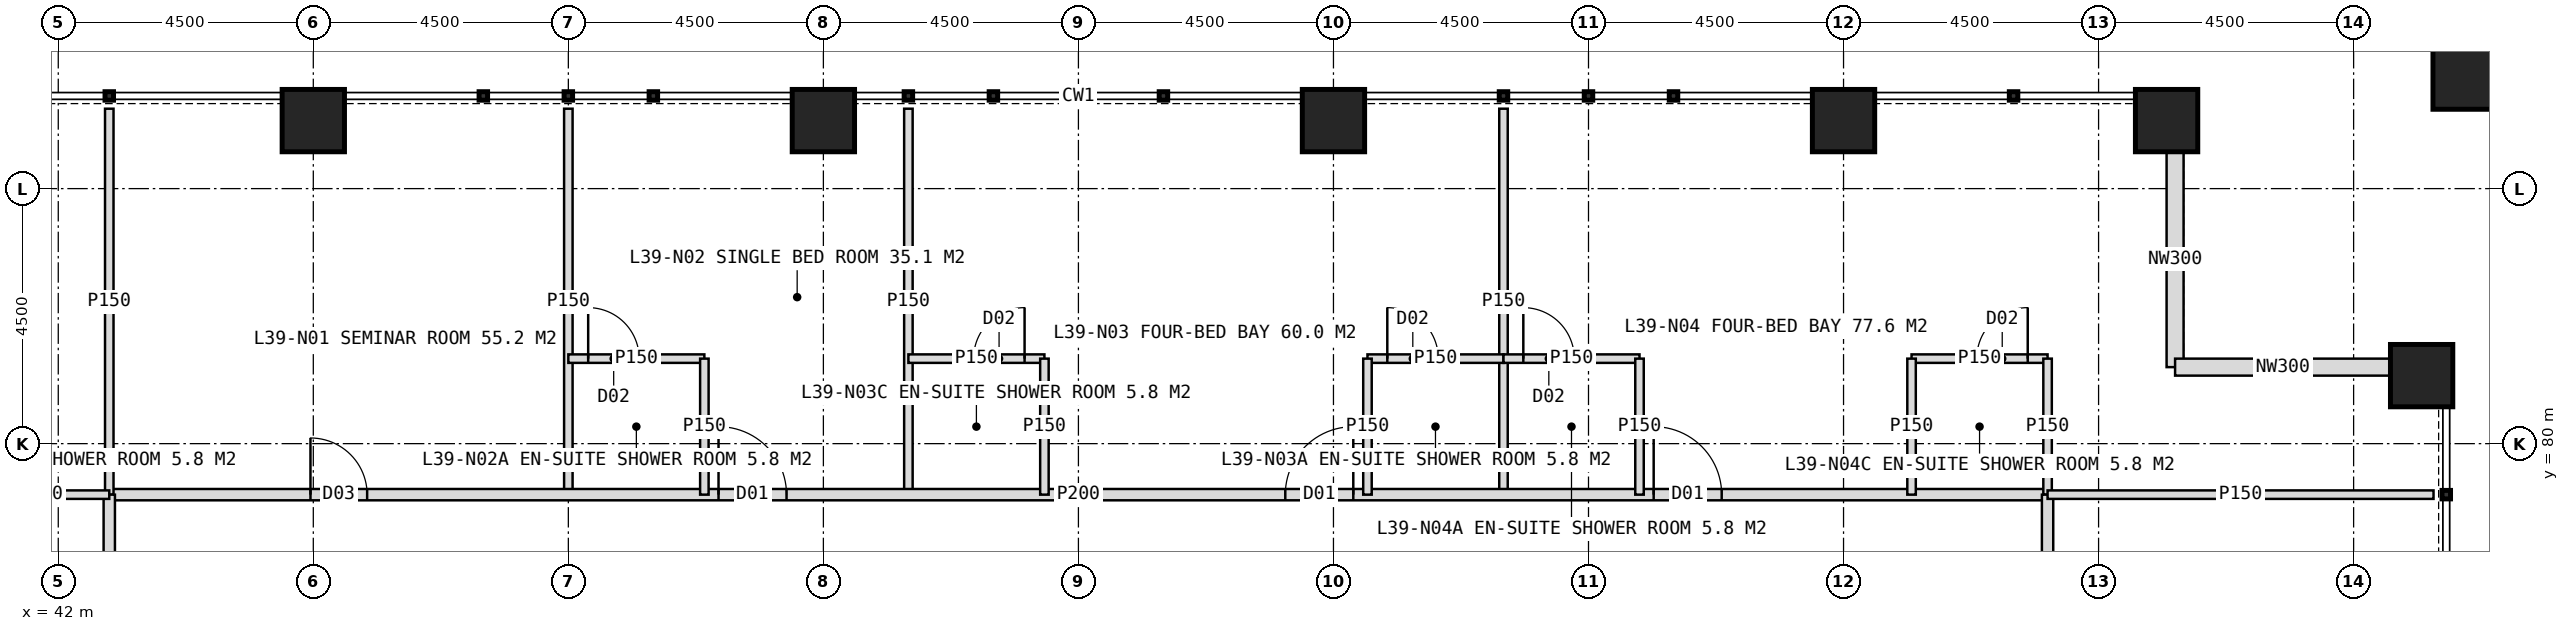
"""IFC4 building model, lengths in metres.
Left out: names, types, materials, properties, quantities, classifications, styles, units other than length and angle.
Written with IfcOpenShell. Run it as: python <this file> out.ifc"""

import sys

from ifc_helpers import new_model, si_unit, direction, frame, frame_2d, origin, origin_2d, place, context, subcontext, project, spatial, rectangle, hollow_rectangle, extrude, element, fill, save


model = new_model("IFC4")
c1 = context("Model", 3, precision=1e-05, world=origin(), true_north=direction((0.0, 1.0)))
c2 = subcontext(c1, "Body", "Model", "MODEL_VIEW")
j1 = project(units=[si_unit("LENGTHUNIT", "METRE"), si_unit("PLANEANGLEUNIT", "RADIAN")], contexts=[c1])
p1 = place(None, origin())
s1 = spatial("IfcSite", under=j1, at=p1, CompositionType="ELEMENT")
p2 = place(p1, origin())
s2 = spatial("IfcBuilding", under=s1, at=p2, CompositionType="ELEMENT")
p3 = place(p2, frame((0.0, 0.0, 164.0)))
s3 = spatial("IfcBuildingStorey", under=s2, at=p3, CompositionType="ELEMENT", Elevation=164.0)
for number, where, z_axis, x_axis in (
    (1, (46.5, 85.7, 0.0), (0.0, 0.0, 1.0), (1.0, 0.0, 0.0)),
    (2, (55.5, 85.7, 0.0), (0.0, 0.0, 1.0), (1.0, 0.0, 0.0)),
    (3, (64.5, 85.7, 0.0), (0.0, 0.0, 1.0), (1.0, 0.0, 0.0)),
    (4, (73.5, 85.7, 0.0), (0.0, 0.0, 1.0), (1.0, 0.0, 0.0)),
    (5, (79.2, 85.7, 0.0), (0.0, 0.0, 1.0), (1.0, 0.0, 0.0)),
    (6, (83.7, 81.2, 0.0), (0.0, 0.0, 1.0), (1.0, 0.0, 0.0)),
):
    element("IfcColumn", number, at=place(p3, frame(where, z_axis=z_axis, x_axis=x_axis)), inside=s3, PredefinedType="COLUMN", context=c2, shape_type="SweptSolid", body=[
        extrude(hollow_rectangle(XDim=1.1, YDim=1.1, WallThickness=0.1, at=origin_2d()), origin(), (0.0, 0.0, 1.0), 4.0),
    ])
p4 = place(p3, frame((84.6, 86.6, 0.0), z_axis=(0.0, 0.0, 1.0), x_axis=(1.0, 0.0, 0.0)))
e7 = element("IfcColumn", 7, at=p4, inside=s3, PredefinedType="COLUMN", context=c2, shape_type="SweptSolid", body=[
    extrude(hollow_rectangle(XDim=1.4, YDim=1.4, WallThickness=0.08, at=origin_2d()), origin(), (0.0, 0.0, 1.0), 4.0),
])
for number, where, z_axis, x_axis in (
    (8, (79.35, 85.15, 0.0), (0.0, 0.0, 1.0), (0.0, -1.0, 0.0)),
    (9, (79.35, 81.35, 0.0), (0.0, 0.0, 1.0), (1.0, 0.0, 0.0)),
):
    element("IfcWall", number, at=place(p3, frame(where, z_axis=z_axis, x_axis=x_axis)), inside=s3, PredefinedType="ELEMENTEDWALL", context=c2, shape_type="SweptSolid", body=[
        extrude(rectangle(XDim=3.8, YDim=0.3, at=frame_2d((1.9, 0.0))), origin(), (0.0, 0.0, 1.0), 4.0),
    ])
for number, where, z_axis, x_axis in (
    (10, (51.0, 79.1, 0.0), (0.0, 0.0, 1.0), (0.0, 1.0, 0.0)),
    (11, (57.0, 79.1, 0.0), (0.0, 0.0, 1.0), (0.0, 1.0, 0.0)),
    (12, (67.5, 79.1, 0.0), (0.0, 0.0, 1.0), (0.0, 1.0, 0.0)),
):
    element("IfcWall", number, at=place(p3, frame(where, z_axis=z_axis, x_axis=x_axis)), inside=s3, PredefinedType="PARTITIONING", context=c2, shape_type="SweptSolid", body=[
        extrude(rectangle(XDim=6.81, YDim=0.15, at=frame_2d((3.405, 0.0))), origin(), (0.0, 0.0, 1.0), 3.75),
    ])
p5 = place(p3, frame((42.9, 79.1, 0.0), z_axis=(0.0, 0.0, 1.0), x_axis=(1.0, 0.0, 0.0)))
e13 = element("IfcWall", 13, at=p5, inside=s3, PredefinedType="PARTITIONING", context=c2, shape_type="SweptSolid", body=[
    extrude(rectangle(XDim=34.2, YDim=0.2, at=frame_2d((17.1, 0.0))), origin(), (0.0, 0.0, 1.0), 3.75),
])
p6 = place(p5, frame((3.55, 0.0, 0.0)))
e14 = element("IfcOpeningElement", 14, at=p6, cuts=e13, PredefinedType="OPENING", context=c2, shape_type="SweptSolid", body=[
    extrude(rectangle(XDim=1.0, YDim=2.1, at=frame_2d((0.5, 1.05))), frame((0.0, 0.11, 0.0), z_axis=(0.0, -1.0, 0.0), x_axis=(1.0, 0.0, 0.0)), (0.0, 0.0, 1.0), 0.22),
])
p7 = place(p5, frame((10.75, 0.0, 0.0)))
e15 = element("IfcOpeningElement", 15, at=p7, cuts=e13, PredefinedType="OPENING", context=c2, shape_type="SweptSolid", body=[
    extrude(rectangle(XDim=1.2, YDim=2.2, at=frame_2d((0.6, 1.1))), frame((0.0, 0.11, 0.0), z_axis=(0.0, -1.0, 0.0), x_axis=(1.0, 0.0, 0.0)), (0.0, 0.0, 1.0), 0.22),
])
p8 = place(p5, frame((20.75, 0.0, 0.0)))
e16 = element("IfcOpeningElement", 16, at=p8, cuts=e13, PredefinedType="OPENING", context=c2, shape_type="SweptSolid", body=[
    extrude(rectangle(XDim=1.2, YDim=2.2, at=frame_2d((0.6, 1.1))), frame((0.0, 0.11, 0.0), z_axis=(0.0, -1.0, 0.0), x_axis=(1.0, 0.0, 0.0)), (0.0, 0.0, 1.0), 0.22),
])
p9 = place(p5, frame((27.25, 0.0, 0.0)))
e17 = element("IfcOpeningElement", 17, at=p9, cuts=e13, PredefinedType="OPENING", context=c2, shape_type="SweptSolid", body=[
    extrude(rectangle(XDim=1.2, YDim=2.2, at=frame_2d((0.6, 1.1))), frame((0.0, 0.11, 0.0), z_axis=(0.0, -1.0, 0.0), x_axis=(1.0, 0.0, 0.0)), (0.0, 0.0, 1.0), 0.22),
])
p10 = place(p3, frame((42.9, 79.1, 0.0), z_axis=(0.0, 0.0, 1.0), x_axis=(0.0, 1.0, 0.0)))
e18 = element("IfcWall", 18, at=p10, inside=s3, PredefinedType="PARTITIONING", context=c2, shape_type="SweptSolid", body=[
    extrude(rectangle(XDim=6.81, YDim=0.15, at=frame_2d((3.405, 0.0))), origin(), (0.0, 0.0, 1.0), 3.75),
])
p11 = place(p3, frame((51.0, 81.5, 0.0), z_axis=(0.0, 0.0, 1.0), x_axis=(1.0, 0.0, 0.0)))
e19 = element("IfcWall", 19, at=p11, inside=s3, PredefinedType="PARTITIONING", context=c2, shape_type="SweptSolid", body=[
    extrude(rectangle(XDim=2.4, YDim=0.15, at=frame_2d((1.2, 0.0))), origin(), (0.0, 0.0, 1.0), 3.75),
])
p12 = place(p11, frame((0.35, 0.0, 0.0)))
e20 = element("IfcOpeningElement", 20, at=p12, cuts=e19, PredefinedType="OPENING", context=c2, shape_type="SweptSolid", body=[
    extrude(rectangle(XDim=0.9, YDim=2.1, at=frame_2d((0.45, 1.05))), frame((0.0, 0.085, 0.0), z_axis=(0.0, -1.0, 0.0), x_axis=(1.0, 0.0, 0.0)), (0.0, 0.0, 1.0), 0.17),
])
p13 = place(p3, frame((53.4, 79.1, 0.0), z_axis=(0.0, 0.0, 1.0), x_axis=(0.0, 1.0, 0.0)))
e21 = element("IfcWall", 21, at=p13, inside=s3, PredefinedType="PARTITIONING", context=c2, shape_type="SweptSolid", body=[
    extrude(rectangle(XDim=2.4, YDim=0.15, at=frame_2d((1.2, 0.0))), origin(), (0.0, 0.0, 1.0), 3.75),
])
p14 = place(p3, frame((65.1, 81.5, 0.0), z_axis=(0.0, 0.0, 1.0), x_axis=(1.0, 0.0, 0.0)))
e22 = element("IfcWall", 22, at=p14, inside=s3, PredefinedType="PARTITIONING", context=c2, shape_type="SweptSolid", body=[
    extrude(rectangle(XDim=2.4, YDim=0.15, at=frame_2d((1.2, 0.0))), origin(), (0.0, 0.0, 1.0), 3.75),
])
p15 = place(p14, frame((0.35, 0.0, 0.0)))
e23 = element("IfcOpeningElement", 23, at=p15, cuts=e22, PredefinedType="OPENING", context=c2, shape_type="SweptSolid", body=[
    extrude(rectangle(XDim=0.9, YDim=2.1, at=frame_2d((0.45, 1.05))), frame((0.0, 0.085, 0.0), z_axis=(0.0, -1.0, 0.0), x_axis=(1.0, 0.0, 0.0)), (0.0, 0.0, 1.0), 0.17),
])
p16 = place(p3, frame((65.1, 79.1, 0.0), z_axis=(0.0, 0.0, 1.0), x_axis=(0.0, 1.0, 0.0)))
e24 = element("IfcWall", 24, at=p16, inside=s3, PredefinedType="PARTITIONING", context=c2, shape_type="SweptSolid", body=[
    extrude(rectangle(XDim=2.4, YDim=0.15, at=frame_2d((1.2, 0.0))), origin(), (0.0, 0.0, 1.0), 3.75),
])
p17 = place(p3, frame((57.0, 81.5, 0.0), z_axis=(0.0, 0.0, 1.0), x_axis=(1.0, 0.0, 0.0)))
e25 = element("IfcWall", 25, at=p17, inside=s3, PredefinedType="PARTITIONING", context=c2, shape_type="SweptSolid", body=[
    extrude(rectangle(XDim=2.4, YDim=0.15, at=frame_2d((1.2, 0.0))), origin(), (0.0, 0.0, 1.0), 3.75),
])
p18 = place(p17, frame((1.15, 0.0, 0.0)))
e26 = element("IfcOpeningElement", 26, at=p18, cuts=e25, PredefinedType="OPENING", context=c2, shape_type="SweptSolid", body=[
    extrude(rectangle(XDim=0.9, YDim=2.1, at=frame_2d((0.45, 1.05))), frame((0.0, 0.085, 0.0), z_axis=(0.0, -1.0, 0.0), x_axis=(1.0, 0.0, 0.0)), (0.0, 0.0, 1.0), 0.17),
])
p19 = place(p3, frame((59.4, 79.1, 0.0), z_axis=(0.0, 0.0, 1.0), x_axis=(0.0, 1.0, 0.0)))
e27 = element("IfcWall", 27, at=p19, inside=s3, PredefinedType="PARTITIONING", context=c2, shape_type="SweptSolid", body=[
    extrude(rectangle(XDim=2.4, YDim=0.15, at=frame_2d((1.2, 0.0))), origin(), (0.0, 0.0, 1.0), 3.75),
])
p20 = place(p3, frame((67.5, 81.5, 0.0), z_axis=(0.0, 0.0, 1.0), x_axis=(1.0, 0.0, 0.0)))
e28 = element("IfcWall", 28, at=p20, inside=s3, PredefinedType="PARTITIONING", context=c2, shape_type="SweptSolid", body=[
    extrude(rectangle(XDim=2.4, YDim=0.15, at=frame_2d((1.2, 0.0))), origin(), (0.0, 0.0, 1.0), 3.75),
])
p21 = place(p20, frame((0.35, 0.0, 0.0)))
e29 = element("IfcOpeningElement", 29, at=p21, cuts=e28, PredefinedType="OPENING", context=c2, shape_type="SweptSolid", body=[
    extrude(rectangle(XDim=0.9, YDim=2.1, at=frame_2d((0.45, 1.05))), frame((0.0, 0.085, 0.0), z_axis=(0.0, -1.0, 0.0), x_axis=(1.0, 0.0, 0.0)), (0.0, 0.0, 1.0), 0.17),
])
p22 = place(p3, frame((69.9, 79.1, 0.0), z_axis=(0.0, 0.0, 1.0), x_axis=(0.0, 1.0, 0.0)))
e30 = element("IfcWall", 30, at=p22, inside=s3, PredefinedType="PARTITIONING", context=c2, shape_type="SweptSolid", body=[
    extrude(rectangle(XDim=2.4, YDim=0.15, at=frame_2d((1.2, 0.0))), origin(), (0.0, 0.0, 1.0), 3.75),
])
p23 = place(p3, frame((74.7, 81.5, 0.0), z_axis=(0.0, 0.0, 1.0), x_axis=(1.0, 0.0, 0.0)))
e31 = element("IfcWall", 31, at=p23, inside=s3, PredefinedType="PARTITIONING", context=c2, shape_type="SweptSolid", body=[
    extrude(rectangle(XDim=2.4, YDim=0.15, at=frame_2d((1.2, 0.0))), origin(), (0.0, 0.0, 1.0), 3.75),
])
p24 = place(p23, frame((1.15, 0.0, 0.0)))
e32 = element("IfcOpeningElement", 32, at=p24, cuts=e31, PredefinedType="OPENING", context=c2, shape_type="SweptSolid", body=[
    extrude(rectangle(XDim=0.9, YDim=2.1, at=frame_2d((0.45, 1.05))), frame((0.0, 0.085, 0.0), z_axis=(0.0, -1.0, 0.0), x_axis=(1.0, 0.0, 0.0)), (0.0, 0.0, 1.0), 0.17),
])
for number, where, z_axis, x_axis in (
    (33, (74.7, 79.1, 0.0), (0.0, 0.0, 1.0), (0.0, 1.0, 0.0)),
    (34, (77.1, 79.1, 0.0), (0.0, 0.0, 1.0), (0.0, 1.0, 0.0)),
):
    element("IfcWall", number, at=place(p3, frame(where, z_axis=z_axis, x_axis=x_axis)), inside=s3, PredefinedType="PARTITIONING", context=c2, shape_type="SweptSolid", body=[
        extrude(rectangle(XDim=2.4, YDim=0.15, at=frame_2d((1.2, 0.0))), origin(), (0.0, 0.0, 1.0), 3.75),
    ])
p25 = place(p3, frame((42.9, 44.9, 0.0), z_axis=(0.0, 0.0, 1.0), x_axis=(0.0, 1.0, 0.0)))
e35 = element("IfcWall", 35, at=p25, inside=s3, PredefinedType="PARTITIONING", context=c2, shape_type="SweptSolid", body=[
    extrude(rectangle(XDim=34.2, YDim=0.2, at=frame_2d((17.1, 0.0))), origin(), (0.0, 0.0, 1.0), 3.75),
])
p26 = place(p25, frame((2.15, 0.0, 0.0)))
e36 = element("IfcOpeningElement", 36, at=p26, cuts=e35, PredefinedType="OPENING", context=c2, shape_type="SweptSolid", body=[
    extrude(rectangle(XDim=1.2, YDim=2.2, at=frame_2d((0.6, 1.1))), frame((0.0, 0.11, 0.0), z_axis=(0.0, -1.0, 0.0), x_axis=(1.0, 0.0, 0.0)), (0.0, 0.0, 1.0), 0.22),
])
p27 = place(p25, frame((9.25, 0.0, 0.0)))
e37 = element("IfcOpeningElement", 37, at=p27, cuts=e35, PredefinedType="OPENING", context=c2, shape_type="SweptSolid", body=[
    extrude(rectangle(XDim=1.2, YDim=2.2, at=frame_2d((0.6, 1.1))), frame((0.0, 0.11, 0.0), z_axis=(0.0, -1.0, 0.0), x_axis=(1.0, 0.0, 0.0)), (0.0, 0.0, 1.0), 0.22),
])
p28 = place(p25, frame((13.25, 0.0, 0.0)))
e38 = element("IfcOpeningElement", 38, at=p28, cuts=e35, PredefinedType="OPENING", context=c2, shape_type="SweptSolid", body=[
    extrude(rectangle(XDim=1.2, YDim=2.2, at=frame_2d((0.6, 1.1))), frame((0.0, 0.11, 0.0), z_axis=(0.0, -1.0, 0.0), x_axis=(1.0, 0.0, 0.0)), (0.0, 0.0, 1.0), 0.22),
])
p29 = place(p25, frame((19.75, 0.0, 0.0)))
e39 = element("IfcOpeningElement", 39, at=p29, cuts=e35, PredefinedType="OPENING", context=c2, shape_type="SweptSolid", body=[
    extrude(rectangle(XDim=1.2, YDim=2.2, at=frame_2d((0.6, 1.1))), frame((0.0, 0.11, 0.0), z_axis=(0.0, -1.0, 0.0), x_axis=(1.0, 0.0, 0.0)), (0.0, 0.0, 1.0), 0.22),
])
p30 = place(p25, frame((30.35, 0.0, 0.0)))
e40 = element("IfcOpeningElement", 40, at=p30, cuts=e35, PredefinedType="OPENING", context=c2, shape_type="SweptSolid", body=[
    extrude(rectangle(XDim=1.2, YDim=2.2, at=frame_2d((0.6, 1.1))), frame((0.0, 0.11, 0.0), z_axis=(0.0, -1.0, 0.0), x_axis=(1.0, 0.0, 0.0)), (0.0, 0.0, 1.0), 0.22),
])
p31 = place(p3, frame((42.9, 79.1, 0.0), z_axis=(0.0, 0.0, 1.0), x_axis=(-1.0, 0.0, 0.0)))
e41 = element("IfcWall", 41, at=p31, inside=s3, PredefinedType="PARTITIONING", context=c2, shape_type="SweptSolid", body=[
    extrude(rectangle(XDim=2.4, YDim=0.15, at=frame_2d((1.2, 0.0))), origin(), (0.0, 0.0, 1.0), 3.75),
])
p32 = place(p3, frame((77.1, 79.1, 0.0), z_axis=(0.0, 0.0, 1.0), x_axis=(0.0, -1.0, 0.0)))
e42 = element("IfcWall", 42, at=p32, inside=s3, PredefinedType="PARTITIONING", context=c2, shape_type="SweptSolid", body=[
    extrude(rectangle(XDim=34.2, YDim=0.2, at=frame_2d((17.1, 0.0))), origin(), (0.0, 0.0, 1.0), 3.75),
])
p33 = place(p32, frame((3.65, 0.0, 0.0)))
e43 = element("IfcOpeningElement", 43, at=p33, cuts=e42, PredefinedType="OPENING", context=c2, shape_type="SweptSolid", body=[
    extrude(rectangle(XDim=1.2, YDim=2.2, at=frame_2d((0.6, 1.1))), frame((0.0, 0.11, 0.0), z_axis=(0.0, -1.0, 0.0), x_axis=(1.0, 0.0, 0.0)), (0.0, 0.0, 1.0), 0.22),
])
p34 = place(p32, frame((10.75, 0.0, 0.0)))
e44 = element("IfcOpeningElement", 44, at=p34, cuts=e42, PredefinedType="OPENING", context=c2, shape_type="SweptSolid", body=[
    extrude(rectangle(XDim=1.2, YDim=2.2, at=frame_2d((0.6, 1.1))), frame((0.0, 0.11, 0.0), z_axis=(0.0, -1.0, 0.0), x_axis=(1.0, 0.0, 0.0)), (0.0, 0.0, 1.0), 0.22),
])
p35 = place(p32, frame((22.25, 0.0, 0.0)))
e45 = element("IfcOpeningElement", 45, at=p35, cuts=e42, PredefinedType="OPENING", context=c2, shape_type="SweptSolid", body=[
    extrude(rectangle(XDim=1.2, YDim=2.2, at=frame_2d((0.6, 1.1))), frame((0.0, 0.11, 0.0), z_axis=(0.0, -1.0, 0.0), x_axis=(1.0, 0.0, 0.0)), (0.0, 0.0, 1.0), 0.22),
])
p36 = place(p32, frame((28.75, 0.0, 0.0)))
e46 = element("IfcOpeningElement", 46, at=p36, cuts=e42, PredefinedType="OPENING", context=c2, shape_type="SweptSolid", body=[
    extrude(rectangle(XDim=1.2, YDim=2.2, at=frame_2d((0.6, 1.1))), frame((0.0, 0.11, 0.0), z_axis=(0.0, -1.0, 0.0), x_axis=(1.0, 0.0, 0.0)), (0.0, 0.0, 1.0), 0.22),
])
p37 = place(p3, frame((77.1, 79.1, 0.0), z_axis=(0.0, 0.0, 1.0), x_axis=(1.0, 0.0, 0.0)))
e47 = element("IfcWall", 47, at=p37, inside=s3, PredefinedType="PARTITIONING", context=c2, shape_type="SweptSolid", body=[
    extrude(rectangle(XDim=6.81, YDim=0.15, at=frame_2d((3.405, 0.0))), origin(), (0.0, 0.0, 1.0), 3.75),
])
p38 = place(p6, origin())
e48 = element("IfcDoor", 48, at=p38, inside=s3, OperationType="SINGLE_SWING_LEFT", PredefinedType="DOOR", context=c2, shape_type="SweptSolid", body=[
    extrude(rectangle(XDim=1.0, YDim=2.1, at=frame_2d((0.5, 1.05))), frame((0.0, 0.025, 0.0), z_axis=(0.0, -1.0, 0.0), x_axis=(1.0, 0.0, 0.0)), (0.0, 0.0, 1.0), 0.05),
])
fill(e14, e48)
p39 = place(p7, origin())
e49 = element("IfcDoor", 49, at=p39, inside=s3, OperationType="SINGLE_SWING_LEFT", PredefinedType="DOOR", context=c2, shape_type="SweptSolid", body=[
    extrude(rectangle(XDim=1.2, YDim=2.2, at=frame_2d((0.6, 1.1))), frame((0.0, 0.025, 0.0), z_axis=(0.0, -1.0, 0.0), x_axis=(1.0, 0.0, 0.0)), (0.0, 0.0, 1.0), 0.05),
])
fill(e15, e49)
p40 = place(p12, origin())
e50 = element("IfcDoor", 50, at=p40, inside=s3, OperationType="SINGLE_SWING_LEFT", PredefinedType="DOOR", context=c2, shape_type="SweptSolid", body=[
    extrude(rectangle(XDim=0.9, YDim=2.1, at=frame_2d((0.45, 1.05))), frame((0.0, 0.025, 0.0), z_axis=(0.0, -1.0, 0.0), x_axis=(1.0, 0.0, 0.0)), (0.0, 0.0, 1.0), 0.05),
])
fill(e20, e50)
p41 = place(p8, origin())
e51 = element("IfcDoor", 51, at=p41, inside=s3, OperationType="SINGLE_SWING_RIGHT", PredefinedType="DOOR", context=c2, shape_type="SweptSolid", body=[
    extrude(rectangle(XDim=1.2, YDim=2.2, at=frame_2d((0.6, 1.1))), frame((0.0, 0.025, 0.0), z_axis=(0.0, -1.0, 0.0), x_axis=(1.0, 0.0, 0.0)), (0.0, 0.0, 1.0), 0.05),
])
fill(e16, e51)
p42 = place(p15, origin())
e52 = element("IfcDoor", 52, at=p42, inside=s3, OperationType="SINGLE_SWING_LEFT", PredefinedType="DOOR", context=c2, shape_type="SweptSolid", body=[
    extrude(rectangle(XDim=0.9, YDim=2.1, at=frame_2d((0.45, 1.05))), frame((0.0, 0.025, 0.0), z_axis=(0.0, -1.0, 0.0), x_axis=(1.0, 0.0, 0.0)), (0.0, 0.0, 1.0), 0.05),
])
fill(e23, e52)
p43 = place(p18, origin())
e53 = element("IfcDoor", 53, at=p43, inside=s3, OperationType="SINGLE_SWING_RIGHT", PredefinedType="DOOR", context=c2, shape_type="SweptSolid", body=[
    extrude(rectangle(XDim=0.9, YDim=2.1, at=frame_2d((0.45, 1.05))), frame((0.0, 0.025, 0.0), z_axis=(0.0, -1.0, 0.0), x_axis=(1.0, 0.0, 0.0)), (0.0, 0.0, 1.0), 0.05),
])
fill(e26, e53)
p44 = place(p9, origin())
e54 = element("IfcDoor", 54, at=p44, inside=s3, OperationType="SINGLE_SWING_LEFT", PredefinedType="DOOR", context=c2, shape_type="SweptSolid", body=[
    extrude(rectangle(XDim=1.2, YDim=2.2, at=frame_2d((0.6, 1.1))), frame((0.0, 0.025, 0.0), z_axis=(0.0, -1.0, 0.0), x_axis=(1.0, 0.0, 0.0)), (0.0, 0.0, 1.0), 0.05),
])
fill(e17, e54)
p45 = place(p21, origin())
e55 = element("IfcDoor", 55, at=p45, inside=s3, OperationType="SINGLE_SWING_LEFT", PredefinedType="DOOR", context=c2, shape_type="SweptSolid", body=[
    extrude(rectangle(XDim=0.9, YDim=2.1, at=frame_2d((0.45, 1.05))), frame((0.0, 0.025, 0.0), z_axis=(0.0, -1.0, 0.0), x_axis=(1.0, 0.0, 0.0)), (0.0, 0.0, 1.0), 0.05),
])
fill(e29, e55)
p46 = place(p24, origin())
e56 = element("IfcDoor", 56, at=p46, inside=s3, OperationType="SINGLE_SWING_RIGHT", PredefinedType="DOOR", context=c2, shape_type="SweptSolid", body=[
    extrude(rectangle(XDim=0.9, YDim=2.1, at=frame_2d((0.45, 1.05))), frame((0.0, 0.025, 0.0), z_axis=(0.0, -1.0, 0.0), x_axis=(1.0, 0.0, 0.0)), (0.0, 0.0, 1.0), 0.05),
])
fill(e32, e56)
save(model, sys.argv[1])
